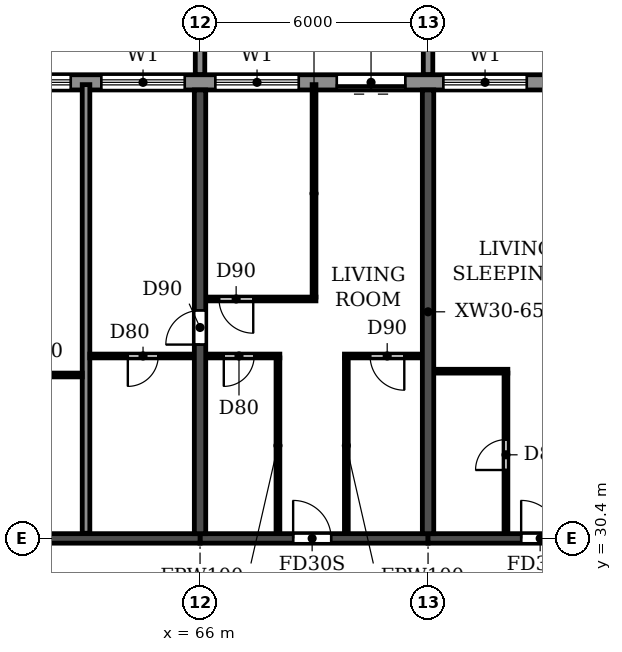
"""IFC4 building model, lengths in metres.
Left out: names, types, materials, properties, quantities, classifications, styles, units other than length and angle.
Written with IfcOpenShell. Run it as: python <this file> out.ifc"""

import sys

from ifc_helpers import new_model, si_unit, direction, frame, frame_2d, origin, place, context, subcontext, project, spatial, polyline, rectangle, outline, extrude, source, transform, mapped, element, fill, save


model = new_model("IFC4")
c1 = context("Model", 3, precision=1e-05, world=origin(), true_north=direction((0.0, 1.0)))
c2 = subcontext(c1, "Body", "Model", "MODEL_VIEW")
j1 = project(units=[si_unit("LENGTHUNIT", "METRE"), si_unit("PLANEANGLEUNIT", "RADIAN")], contexts=[c1])
p1 = place(None, origin())
s1 = spatial("IfcSite", under=j1, at=p1, CompositionType="ELEMENT")
p2 = place(p1, origin())
s2 = spatial("IfcBuilding", under=s1, at=p2, CompositionType="ELEMENT")
p3 = place(p2, frame((0.0, 0.0, 132.3)))
s3 = spatial("IfcBuildingStorey", under=s2, at=p3, CompositionType="ELEMENT", Elevation=132.3)
p4 = place(p3, frame((66.0, 30.525, 0.0), z_axis=(0.0, 0.0, 1.0), x_axis=(0.0, 1.0, 0.0)))
e1 = element("IfcWall", 1, at=p4, inside=s3, PredefinedType="SHEAR", context=c2, shape_type="SweptSolid", body=[
    extrude(rectangle(XDim=11.675, YDim=0.3, at=frame_2d((5.837, 0.0))), origin(), (0.0, 0.0, 1.0), 3.07),
])
p5 = place(p4, frame((4.975, 0.0, 0.0)))
e2 = element("IfcOpeningElement", 2, at=p5, cuts=e1, PredefinedType="OPENING", context=c2, shape_type="SweptSolid", body=[
    extrude(rectangle(XDim=0.9, YDim=2.1, at=frame_2d((0.45, 1.05))), frame((0.0, 0.16, 0.0), z_axis=(0.0, -1.0, 0.0), x_axis=(1.0, 0.0, 0.0)), (0.0, 0.0, 1.0), 0.32),
])
p6 = place(p3, frame((72.0, 30.525, 0.0), z_axis=(0.0, 0.0, 1.0), x_axis=(0.0, 1.0, 0.0)))
e3 = element("IfcWall", 3, at=p6, inside=s3, PredefinedType="SHEAR", context=c2, shape_type="SweptSolid", body=[
    extrude(rectangle(XDim=11.675, YDim=0.3, at=frame_2d((5.837, 0.0))), origin(), (0.0, 0.0, 1.0), 3.07),
])
p7 = place(p3, frame((60.0, 30.4, 0.0), z_axis=(0.0, 0.0, 1.0), x_axis=(1.0, 0.0, 0.0)))
e4 = element("IfcWall", 4, at=p7, inside=s3, PredefinedType="SHEAR", context=c2, shape_type="SweptSolid", body=[
    extrude(rectangle(XDim=6.0, YDim=0.25, at=frame_2d((3.0, 0.0))), origin(), (0.0, 0.0, 1.0), 2.47),
])
p8 = place(p3, frame((66.0, 30.4, 0.0), z_axis=(0.0, 0.0, 1.0), x_axis=(1.0, 0.0, 0.0)))
e5 = element("IfcWall", 5, at=p8, inside=s3, PredefinedType="SHEAR", context=c2, shape_type="SweptSolid", body=[
    extrude(rectangle(XDim=6.0, YDim=0.25, at=frame_2d((3.0, 0.0))), origin(), (0.0, 0.0, 1.0), 2.47),
])
p9 = place(p8, frame((2.45, 0.0, 0.0)))
e6 = element("IfcOpeningElement", 6, at=p9, cuts=e5, PredefinedType="OPENING", context=c2, shape_type="SweptSolid", body=[
    extrude(rectangle(XDim=1.0, YDim=2.1, at=frame_2d((0.5, 1.05))), frame((0.0, 0.135, 0.0), z_axis=(0.0, -1.0, 0.0), x_axis=(1.0, 0.0, 0.0)), (0.0, 0.0, 1.0), 0.27),
])
p10 = place(p3, frame((72.0, 30.4, 0.0), z_axis=(0.0, 0.0, 1.0), x_axis=(1.0, 0.0, 0.0)))
e7 = element("IfcWall", 7, at=p10, inside=s3, PredefinedType="SHEAR", context=c2, shape_type="SweptSolid", body=[
    extrude(rectangle(XDim=6.0, YDim=0.25, at=frame_2d((3.0, 0.0))), origin(), (0.0, 0.0, 1.0), 2.47),
])
p11 = place(p10, frame((2.45, 0.0, 0.0)))
e8 = element("IfcOpeningElement", 8, at=p11, cuts=e7, PredefinedType="OPENING", context=c2, shape_type="SweptSolid", body=[
    extrude(rectangle(XDim=1.0, YDim=2.1, at=frame_2d((0.5, 1.05))), frame((0.0, 0.135, 0.0), z_axis=(0.0, -1.0, 0.0), x_axis=(1.0, 0.0, 0.0)), (0.0, 0.0, 1.0), 0.27),
])
p12 = place(p3, frame((85.317, 42.4, 0.0), z_axis=(0.0, 0.0, 1.0), x_axis=(-1.0, 0.0, 0.0)))
e9 = element("IfcWall", 9, at=p12, inside=s3, PredefinedType="STANDARD", context=c2, shape_type="SweptSolid", body=[
    extrude(rectangle(XDim=68.634, YDim=0.4, at=frame_2d((34.317, 0.0))), origin(), (0.0, 0.0, 1.0), 3.07),
])
p13 = place(p12, frame((64.917, 0.0, 0.0)))
e10 = element("IfcOpeningElement", 10, at=p13, cuts=e9, PredefinedType="OPENING", context=c2, shape_type="SweptSolid", body=[
    extrude(rectangle(XDim=1.8, YDim=2.4, at=frame_2d((0.9, 1.2))), frame((0.0, 0.21, 0.0), z_axis=(0.0, -1.0, 0.0), x_axis=(1.0, 0.0, 0.0)), (0.0, 0.0, 1.0), 0.42),
])
p14 = place(p12, frame((61.717, 0.0, 0.9)))
e11 = element("IfcOpeningElement", 11, at=p14, cuts=e9, PredefinedType="OPENING", context=c2, shape_type="SweptSolid", body=[
    extrude(rectangle(XDim=2.2, YDim=1.5, at=frame_2d((1.1, 0.75))), frame((0.0, 0.21, 0.0), z_axis=(0.0, -1.0, 0.0), x_axis=(1.0, 0.0, 0.0)), (0.0, 0.0, 1.0), 0.42),
])
p15 = place(p12, frame((58.717, 0.0, 0.9)))
e12 = element("IfcOpeningElement", 12, at=p15, cuts=e9, PredefinedType="OPENING", context=c2, shape_type="SweptSolid", body=[
    extrude(rectangle(XDim=2.2, YDim=1.5, at=frame_2d((1.1, 0.75))), frame((0.0, 0.21, 0.0), z_axis=(0.0, -1.0, 0.0), x_axis=(1.0, 0.0, 0.0)), (0.0, 0.0, 1.0), 0.42),
])
p16 = place(p12, frame((55.717, 0.0, 0.9)))
e13 = element("IfcOpeningElement", 13, at=p16, cuts=e9, PredefinedType="OPENING", context=c2, shape_type="SweptSolid", body=[
    extrude(rectangle(XDim=2.2, YDim=1.5, at=frame_2d((1.1, 0.75))), frame((0.0, 0.21, 0.0), z_axis=(0.0, -1.0, 0.0), x_axis=(1.0, 0.0, 0.0)), (0.0, 0.0, 1.0), 0.42),
])
p17 = place(p12, frame((52.917, 0.0, 0.0)))
e14 = element("IfcOpeningElement", 14, at=p17, cuts=e9, PredefinedType="OPENING", context=c2, shape_type="SweptSolid", body=[
    extrude(rectangle(XDim=1.8, YDim=2.4, at=frame_2d((0.9, 1.2))), frame((0.0, 0.21, 0.0), z_axis=(0.0, -1.0, 0.0), x_axis=(1.0, 0.0, 0.0)), (0.0, 0.0, 1.0), 0.42),
])
p18 = place(p12, frame((49.717, 0.0, 0.9)))
e15 = element("IfcOpeningElement", 15, at=p18, cuts=e9, PredefinedType="OPENING", context=c2, shape_type="SweptSolid", body=[
    extrude(rectangle(XDim=2.2, YDim=1.5, at=frame_2d((1.1, 0.75))), frame((0.0, 0.21, 0.0), z_axis=(0.0, -1.0, 0.0), x_axis=(1.0, 0.0, 0.0)), (0.0, 0.0, 1.0), 0.42),
])
p19 = place(p12, frame((46.717, 0.0, 0.9)))
e16 = element("IfcOpeningElement", 16, at=p19, cuts=e9, PredefinedType="OPENING", context=c2, shape_type="SweptSolid", body=[
    extrude(rectangle(XDim=2.2, YDim=1.5, at=frame_2d((1.1, 0.75))), frame((0.0, 0.21, 0.0), z_axis=(0.0, -1.0, 0.0), x_axis=(1.0, 0.0, 0.0)), (0.0, 0.0, 1.0), 0.42),
])
p20 = place(p12, frame((43.917, 0.0, 0.0)))
e17 = element("IfcOpeningElement", 17, at=p20, cuts=e9, PredefinedType="OPENING", context=c2, shape_type="SweptSolid", body=[
    extrude(rectangle(XDim=1.8, YDim=2.4, at=frame_2d((0.9, 1.2))), frame((0.0, 0.21, 0.0), z_axis=(0.0, -1.0, 0.0), x_axis=(1.0, 0.0, 0.0)), (0.0, 0.0, 1.0), 0.42),
])
p21 = place(p12, frame((40.917, 0.0, 0.0)))
e18 = element("IfcOpeningElement", 18, at=p21, cuts=e9, PredefinedType="OPENING", context=c2, shape_type="SweptSolid", body=[
    extrude(rectangle(XDim=1.8, YDim=2.4, at=frame_2d((0.9, 1.2))), frame((0.0, 0.21, 0.0), z_axis=(0.0, -1.0, 0.0), x_axis=(1.0, 0.0, 0.0)), (0.0, 0.0, 1.0), 0.42),
])
p22 = place(p12, frame((37.717, 0.0, 0.9)))
e19 = element("IfcOpeningElement", 19, at=p22, cuts=e9, PredefinedType="OPENING", context=c2, shape_type="SweptSolid", body=[
    extrude(rectangle(XDim=2.2, YDim=1.5, at=frame_2d((1.1, 0.75))), frame((0.0, 0.21, 0.0), z_axis=(0.0, -1.0, 0.0), x_axis=(1.0, 0.0, 0.0)), (0.0, 0.0, 1.0), 0.42),
])
p23 = place(p12, frame((34.717, 0.0, 0.9)))
e20 = element("IfcOpeningElement", 20, at=p23, cuts=e9, PredefinedType="OPENING", context=c2, shape_type="SweptSolid", body=[
    extrude(rectangle(XDim=2.2, YDim=1.5, at=frame_2d((1.1, 0.75))), frame((0.0, 0.21, 0.0), z_axis=(0.0, -1.0, 0.0), x_axis=(1.0, 0.0, 0.0)), (0.0, 0.0, 1.0), 0.42),
])
p24 = place(p12, frame((31.717, 0.0, 0.9)))
e21 = element("IfcOpeningElement", 21, at=p24, cuts=e9, PredefinedType="OPENING", context=c2, shape_type="SweptSolid", body=[
    extrude(rectangle(XDim=2.2, YDim=1.5, at=frame_2d((1.1, 0.75))), frame((0.0, 0.21, 0.0), z_axis=(0.0, -1.0, 0.0), x_axis=(1.0, 0.0, 0.0)), (0.0, 0.0, 1.0), 0.42),
])
p25 = place(p12, frame((28.917, 0.0, 0.0)))
e22 = element("IfcOpeningElement", 22, at=p25, cuts=e9, PredefinedType="OPENING", context=c2, shape_type="SweptSolid", body=[
    extrude(rectangle(XDim=1.8, YDim=2.4, at=frame_2d((0.9, 1.2))), frame((0.0, 0.21, 0.0), z_axis=(0.0, -1.0, 0.0), x_axis=(1.0, 0.0, 0.0)), (0.0, 0.0, 1.0), 0.42),
])
p26 = place(p12, frame((25.717, 0.0, 0.9)))
e23 = element("IfcOpeningElement", 23, at=p26, cuts=e9, PredefinedType="OPENING", context=c2, shape_type="SweptSolid", body=[
    extrude(rectangle(XDim=2.2, YDim=1.5, at=frame_2d((1.1, 0.75))), frame((0.0, 0.21, 0.0), z_axis=(0.0, -1.0, 0.0), x_axis=(1.0, 0.0, 0.0)), (0.0, 0.0, 1.0), 0.42),
])
p27 = place(p12, frame((22.717, 0.0, 0.9)))
e24 = element("IfcOpeningElement", 24, at=p27, cuts=e9, PredefinedType="OPENING", context=c2, shape_type="SweptSolid", body=[
    extrude(rectangle(XDim=2.2, YDim=1.5, at=frame_2d((1.1, 0.75))), frame((0.0, 0.21, 0.0), z_axis=(0.0, -1.0, 0.0), x_axis=(1.0, 0.0, 0.0)), (0.0, 0.0, 1.0), 0.42),
])
p28 = place(p12, frame((19.717, 0.0, 0.9)))
e25 = element("IfcOpeningElement", 25, at=p28, cuts=e9, PredefinedType="OPENING", context=c2, shape_type="SweptSolid", body=[
    extrude(rectangle(XDim=2.2, YDim=1.5, at=frame_2d((1.1, 0.75))), frame((0.0, 0.21, 0.0), z_axis=(0.0, -1.0, 0.0), x_axis=(1.0, 0.0, 0.0)), (0.0, 0.0, 1.0), 0.42),
])
p29 = place(p12, frame((16.717, 0.0, 0.9)))
e26 = element("IfcOpeningElement", 26, at=p29, cuts=e9, PredefinedType="OPENING", context=c2, shape_type="SweptSolid", body=[
    extrude(rectangle(XDim=2.2, YDim=1.5, at=frame_2d((1.1, 0.75))), frame((0.0, 0.21, 0.0), z_axis=(0.0, -1.0, 0.0), x_axis=(1.0, 0.0, 0.0)), (0.0, 0.0, 1.0), 0.42),
])
p30 = place(p12, frame((13.917, 0.0, 0.0)))
e27 = element("IfcOpeningElement", 27, at=p30, cuts=e9, PredefinedType="OPENING", context=c2, shape_type="SweptSolid", body=[
    extrude(rectangle(XDim=1.8, YDim=2.4, at=frame_2d((0.9, 1.2))), frame((0.0, 0.21, 0.0), z_axis=(0.0, -1.0, 0.0), x_axis=(1.0, 0.0, 0.0)), (0.0, 0.0, 1.0), 0.42),
])
p31 = place(p12, frame((10.717, 0.0, 0.9)))
e28 = element("IfcOpeningElement", 28, at=p31, cuts=e9, PredefinedType="OPENING", context=c2, shape_type="SweptSolid", body=[
    extrude(rectangle(XDim=2.2, YDim=1.5, at=frame_2d((1.1, 0.75))), frame((0.0, 0.21, 0.0), z_axis=(0.0, -1.0, 0.0), x_axis=(1.0, 0.0, 0.0)), (0.0, 0.0, 1.0), 0.42),
])
p32 = place(p12, frame((7.917, 0.0, 0.0)))
e29 = element("IfcOpeningElement", 29, at=p32, cuts=e9, PredefinedType="OPENING", context=c2, shape_type="SweptSolid", body=[
    extrude(rectangle(XDim=1.8, YDim=2.4, at=frame_2d((0.9, 1.2))), frame((0.0, 0.21, 0.0), z_axis=(0.0, -1.0, 0.0), x_axis=(1.0, 0.0, 0.0)), (0.0, 0.0, 1.0), 0.42),
])
p33 = place(p12, frame((4.717, 0.0, 0.9)))
e30 = element("IfcOpeningElement", 30, at=p33, cuts=e9, PredefinedType="OPENING", context=c2, shape_type="SweptSolid", body=[
    extrude(rectangle(XDim=2.2, YDim=1.5, at=frame_2d((1.1, 0.75))), frame((0.0, 0.21, 0.0), z_axis=(0.0, -1.0, 0.0), x_axis=(1.0, 0.0, 0.0)), (0.0, 0.0, 1.0), 0.42),
])
p34 = place(p12, frame((1.917, 0.0, 0.0)))
e31 = element("IfcOpeningElement", 31, at=p34, cuts=e9, PredefinedType="OPENING", context=c2, shape_type="SweptSolid", body=[
    extrude(rectangle(XDim=1.8, YDim=2.4, at=frame_2d((0.9, 1.2))), frame((0.0, 0.21, 0.0), z_axis=(0.0, -1.0, 0.0), x_axis=(1.0, 0.0, 0.0)), (0.0, 0.0, 1.0), 0.42),
])
m1 = source(origin(), c2, "Body", "SweptSolid", [
    extrude(outline(polyline([(0.0, 0.0), (0.25, 0.0), (0.25, 3.1), (0.0, 3.1), (0.0, 0.0)])), origin(), (0.0, 0.0, 1.0), 3.1),
])
for number, where in (
    (32, (65.875, 42.6, 0.0)),
    (33, (71.875, 42.6, 0.0)),
):
    element("IfcWall", number, at=place(p3, frame(where)), inside=s3, PredefinedType="STANDARD", context=c2, shape_type="MappedRepresentation", body=[
        mapped(m1, transform((0.0, 0.0, 0.0))),
    ])
p35 = place(p3, frame((63.0, 30.535, 0.0), z_axis=(0.0, 0.0, 1.0), x_axis=(0.0, 1.0, 0.0)))
e34 = element("IfcWall", 34, at=p35, inside=s3, PredefinedType="PARTITIONING", context=c2, shape_type="SweptSolid", body=[
    extrude(rectangle(XDim=11.805, YDim=0.2, at=frame_2d((5.903, 0.0))), origin(), (0.0, 0.0, 1.0), 3.07),
])
p36 = place(p3, frame((60.16, 34.7, 0.0), z_axis=(0.0, 0.0, 1.0), x_axis=(1.0, 0.0, 0.0)))
e35 = element("IfcWall", 35, at=p36, inside=s3, PredefinedType="PARTITIONING", context=c2, shape_type="SweptSolid", body=[
    extrude(rectangle(XDim=2.74, YDim=0.1, at=frame_2d((1.37, 0.0))), origin(), (0.0, 0.0, 1.0), 3.07),
])
p37 = place(p36, frame((0.94, 0.0, 0.0)))
e36 = element("IfcOpeningElement", 36, at=p37, cuts=e35, PredefinedType="OPENING", context=c2, shape_type="SweptSolid", body=[
    extrude(rectangle(XDim=0.8, YDim=2.1, at=frame_2d((0.4, 1.05))), frame((0.0, 0.06, 0.0), z_axis=(0.0, -1.0, 0.0), x_axis=(1.0, 0.0, 0.0)), (0.0, 0.0, 1.0), 0.12),
])
p38 = place(p3, frame((72.16, 34.8, 0.0), z_axis=(0.0, 0.0, 1.0), x_axis=(1.0, 0.0, 0.0)))
e37 = element("IfcWall", 37, at=p38, inside=s3, PredefinedType="PARTITIONING", context=c2, shape_type="SweptSolid", body=[
    extrude(rectangle(XDim=1.94, YDim=0.1, at=frame_2d((0.97, 0.0))), origin(), (0.0, 0.0, 1.0), 3.07),
])
p39 = place(p3, frame((63.1, 35.2, 0.0), z_axis=(0.0, 0.0, 1.0), x_axis=(1.0, 0.0, 0.0)))
e38 = element("IfcWall", 38, at=p39, inside=s3, PredefinedType="PARTITIONING", context=c2, shape_type="SweptSolid", body=[
    extrude(rectangle(XDim=2.74, YDim=0.1, at=frame_2d((1.37, 0.0))), origin(), (0.0, 0.0, 1.0), 3.07),
])
p40 = place(p39, frame((1.0, 0.0, 0.0)))
e39 = element("IfcOpeningElement", 39, at=p40, cuts=e38, PredefinedType="OPENING", context=c2, shape_type="SweptSolid", body=[
    extrude(rectangle(XDim=0.8, YDim=2.1, at=frame_2d((0.4, 1.05))), frame((0.0, 0.06, 0.0), z_axis=(0.0, -1.0, 0.0), x_axis=(1.0, 0.0, 0.0)), (0.0, 0.0, 1.0), 0.12),
])
p41 = place(p3, frame((66.16, 35.2, 0.0), z_axis=(0.0, 0.0, 1.0), x_axis=(1.0, 0.0, 0.0)))
e40 = element("IfcWall", 40, at=p41, inside=s3, PredefinedType="PARTITIONING", context=c2, shape_type="SweptSolid", body=[
    extrude(rectangle(XDim=1.94, YDim=0.1, at=frame_2d((0.97, 0.0))), origin(), (0.0, 0.0, 1.0), 3.07),
])
p42 = place(p41, frame((0.465, 0.0, 0.0)))
e41 = element("IfcOpeningElement", 41, at=p42, cuts=e40, PredefinedType="OPENING", context=c2, shape_type="SweptSolid", body=[
    extrude(rectangle(XDim=0.8, YDim=2.1, at=frame_2d((0.4, 1.05))), frame((0.0, 0.06, 0.0), z_axis=(0.0, -1.0, 0.0), x_axis=(1.0, 0.0, 0.0)), (0.0, 0.0, 1.0), 0.12),
])
p43 = place(p3, frame((69.8, 35.2, 0.0), z_axis=(0.0, 0.0, 1.0), x_axis=(1.0, 0.0, 0.0)))
e42 = element("IfcWall", 42, at=p43, inside=s3, PredefinedType="PARTITIONING", context=c2, shape_type="SweptSolid", body=[
    extrude(rectangle(XDim=2.04, YDim=0.1, at=frame_2d((1.02, 0.0))), origin(), (0.0, 0.0, 1.0), 3.07),
])
p44 = place(p43, frame((0.675, 0.0, 0.0)))
e43 = element("IfcOpeningElement", 43, at=p44, cuts=e42, PredefinedType="OPENING", context=c2, shape_type="SweptSolid", body=[
    extrude(rectangle(XDim=0.9, YDim=2.1, at=frame_2d((0.45, 1.05))), frame((0.0, 0.06, 0.0), z_axis=(0.0, -1.0, 0.0), x_axis=(1.0, 0.0, 0.0)), (0.0, 0.0, 1.0), 0.12),
])
p45 = place(p3, frame((66.16, 36.7, 0.0), z_axis=(0.0, 0.0, 1.0), x_axis=(1.0, 0.0, 0.0)))
e44 = element("IfcWall", 44, at=p45, inside=s3, PredefinedType="PARTITIONING", context=c2, shape_type="SweptSolid", body=[
    extrude(rectangle(XDim=2.89, YDim=0.1, at=frame_2d((1.445, 0.0))), origin(), (0.0, 0.0, 1.0), 3.07),
])
p46 = place(p45, frame((0.34, 0.0, 0.0)))
e45 = element("IfcOpeningElement", 45, at=p46, cuts=e44, PredefinedType="OPENING", context=c2, shape_type="SweptSolid", body=[
    extrude(rectangle(XDim=0.9, YDim=2.1, at=frame_2d((0.45, 1.05))), frame((0.0, 0.06, 0.0), z_axis=(0.0, -1.0, 0.0), x_axis=(1.0, 0.0, 0.0)), (0.0, 0.0, 1.0), 0.12),
])
p47 = place(p3, frame((68.05, 30.535, 0.0), z_axis=(0.0, 0.0, 1.0), x_axis=(0.0, 1.0, 0.0)))
e46 = element("IfcWall", 46, at=p47, inside=s3, PredefinedType="PARTITIONING", context=c2, shape_type="SweptSolid", body=[
    extrude(rectangle(XDim=4.615, YDim=0.1, at=frame_2d((2.308, 0.0))), origin(), (0.0, 0.0, 1.0), 3.07),
])
p48 = place(p3, frame((69.0, 36.75, 0.0), z_axis=(0.0, 0.0, 1.0), x_axis=(0.0, 1.0, 0.0)))
e47 = element("IfcWall", 47, at=p48, inside=s3, PredefinedType="PARTITIONING", context=c2, shape_type="SweptSolid", body=[
    extrude(rectangle(XDim=5.59, YDim=0.1, at=frame_2d((2.795, 0.0))), origin(), (0.0, 0.0, 1.0), 3.07),
])
p49 = place(p3, frame((69.85, 30.535, 0.0), z_axis=(0.0, 0.0, 1.0), x_axis=(0.0, 1.0, 0.0)))
e48 = element("IfcWall", 48, at=p49, inside=s3, PredefinedType="PARTITIONING", context=c2, shape_type="SweptSolid", body=[
    extrude(rectangle(XDim=4.615, YDim=0.1, at=frame_2d((2.308, 0.0))), origin(), (0.0, 0.0, 1.0), 3.07),
])
p50 = place(p3, frame((74.05, 30.535, 0.0), z_axis=(0.0, 0.0, 1.0), x_axis=(0.0, 1.0, 0.0)))
e49 = element("IfcWall", 49, at=p50, inside=s3, PredefinedType="PARTITIONING", context=c2, shape_type="SweptSolid", body=[
    extrude(rectangle(XDim=4.215, YDim=0.1, at=frame_2d((2.107, 0.0))), origin(), (0.0, 0.0, 1.0), 3.07),
])
p51 = place(p50, frame((1.665, 0.0, 0.0)))
e50 = element("IfcOpeningElement", 50, at=p51, cuts=e49, PredefinedType="OPENING", context=c2, shape_type="SweptSolid", body=[
    extrude(rectangle(XDim=0.8, YDim=2.1, at=frame_2d((0.4, 1.05))), frame((0.0, 0.06, 0.0), z_axis=(0.0, -1.0, 0.0), x_axis=(1.0, 0.0, 0.0)), (0.0, 0.0, 1.0), 0.12),
])
p52 = place(p27, origin())
e51 = element("IfcWindow", 51, at=p52, inside=s3, PartitioningType="DOUBLE_PANEL_HORIZONTAL", PredefinedType="WINDOW", context=c2, shape_type="SweptSolid", body=[
    extrude(rectangle(XDim=2.2, YDim=1.5, at=frame_2d((1.1, 0.75))), frame((0.0, 0.03, 0.0), z_axis=(0.0, -1.0, 0.0), x_axis=(1.0, 0.0, 0.0)), (0.0, 0.0, 1.0), 0.06),
])
fill(e24, e51)
p53 = place(p28, origin())
e52 = element("IfcWindow", 52, at=p53, inside=s3, PartitioningType="DOUBLE_PANEL_HORIZONTAL", PredefinedType="WINDOW", context=c2, shape_type="SweptSolid", body=[
    extrude(rectangle(XDim=2.2, YDim=1.5, at=frame_2d((1.1, 0.75))), frame((0.0, 0.03, 0.0), z_axis=(0.0, -1.0, 0.0), x_axis=(1.0, 0.0, 0.0)), (0.0, 0.0, 1.0), 0.06),
])
fill(e25, e52)
p54 = place(p29, origin())
e53 = element("IfcWindow", 53, at=p54, inside=s3, PartitioningType="DOUBLE_PANEL_HORIZONTAL", PredefinedType="WINDOW", context=c2, shape_type="SweptSolid", body=[
    extrude(rectangle(XDim=2.2, YDim=1.5, at=frame_2d((1.1, 0.75))), frame((0.0, 0.03, 0.0), z_axis=(0.0, -1.0, 0.0), x_axis=(1.0, 0.0, 0.0)), (0.0, 0.0, 1.0), 0.06),
])
fill(e26, e53)
p55 = place(p30, origin())
e54 = element("IfcDoor", 54, at=p55, inside=s3, OperationType="DOUBLE_DOOR_SLIDING", PredefinedType="DOOR", context=c2, shape_type="SweptSolid", body=[
    extrude(rectangle(XDim=1.8, YDim=2.4, at=frame_2d((0.9, 1.2))), frame((0.0, 0.025, 0.0), z_axis=(0.0, -1.0, 0.0), x_axis=(1.0, 0.0, 0.0)), (0.0, 0.0, 1.0), 0.05),
])
fill(e27, e54)
p56 = place(p31, origin())
e55 = element("IfcWindow", 55, at=p56, inside=s3, PartitioningType="DOUBLE_PANEL_HORIZONTAL", PredefinedType="WINDOW", context=c2, shape_type="SweptSolid", body=[
    extrude(rectangle(XDim=2.2, YDim=1.5, at=frame_2d((1.1, 0.75))), frame((0.0, 0.03, 0.0), z_axis=(0.0, -1.0, 0.0), x_axis=(1.0, 0.0, 0.0)), (0.0, 0.0, 1.0), 0.06),
])
fill(e28, e55)
p57 = place(p40, frame((0.8, 0.0, 0.0), z_axis=(0.0, 0.0, 1.0), x_axis=(-1.0, 0.0, 0.0)))
e56 = element("IfcDoor", 56, at=p57, inside=s3, OperationType="SINGLE_SWING_RIGHT", PredefinedType="DOOR", context=c2, shape_type="SweptSolid", body=[
    extrude(rectangle(XDim=0.8, YDim=2.1, at=frame_2d((0.4, 1.05))), frame((0.0, 0.025, 0.0), z_axis=(0.0, -1.0, 0.0), x_axis=(1.0, 0.0, 0.0)), (0.0, 0.0, 1.0), 0.05),
])
fill(e39, e56)
p58 = place(p5, origin())
e57 = element("IfcDoor", 57, at=p58, inside=s3, OperationType="SINGLE_SWING_LEFT", PredefinedType="DOOR", context=c2, shape_type="SweptSolid", body=[
    extrude(rectangle(XDim=0.9, YDim=2.1, at=frame_2d((0.45, 1.05))), frame((0.0, 0.025, 0.0), z_axis=(0.0, -1.0, 0.0), x_axis=(1.0, 0.0, 0.0)), (0.0, 0.0, 1.0), 0.05),
])
fill(e2, e57)
p59 = place(p46, frame((0.9, 0.0, 0.0), z_axis=(0.0, 0.0, 1.0), x_axis=(-1.0, 0.0, 0.0)))
e58 = element("IfcDoor", 58, at=p59, inside=s3, OperationType="SINGLE_SWING_LEFT", PredefinedType="DOOR", context=c2, shape_type="SweptSolid", body=[
    extrude(rectangle(XDim=0.9, YDim=2.1, at=frame_2d((0.45, 1.05))), frame((0.0, 0.025, 0.0), z_axis=(0.0, -1.0, 0.0), x_axis=(1.0, 0.0, 0.0)), (0.0, 0.0, 1.0), 0.05),
])
fill(e45, e58)
p60 = place(p42, frame((0.8, 0.0, 0.0), z_axis=(0.0, 0.0, 1.0), x_axis=(-1.0, 0.0, 0.0)))
e59 = element("IfcDoor", 59, at=p60, inside=s3, OperationType="SINGLE_SWING_RIGHT", PredefinedType="DOOR", context=c2, shape_type="SweptSolid", body=[
    extrude(rectangle(XDim=0.8, YDim=2.1, at=frame_2d((0.4, 1.05))), frame((0.0, 0.025, 0.0), z_axis=(0.0, -1.0, 0.0), x_axis=(1.0, 0.0, 0.0)), (0.0, 0.0, 1.0), 0.05),
])
fill(e41, e59)
p61 = place(p9, origin())
e60 = element("IfcDoor", 60, at=p61, inside=s3, OperationType="SINGLE_SWING_LEFT", PredefinedType="DOOR", context=c2, shape_type="SweptSolid", body=[
    extrude(rectangle(XDim=1.0, YDim=2.1, at=frame_2d((0.5, 1.05))), frame((0.0, 0.025, 0.0), z_axis=(0.0, -1.0, 0.0), x_axis=(1.0, 0.0, 0.0)), (0.0, 0.0, 1.0), 0.05),
])
fill(e6, e60)
p62 = place(p44, frame((0.9, 0.0, 0.0), z_axis=(0.0, 0.0, 1.0), x_axis=(-1.0, 0.0, 0.0)))
e61 = element("IfcDoor", 61, at=p62, inside=s3, OperationType="SINGLE_SWING_LEFT", PredefinedType="DOOR", context=c2, shape_type="SweptSolid", body=[
    extrude(rectangle(XDim=0.9, YDim=2.1, at=frame_2d((0.45, 1.05))), frame((0.0, 0.025, 0.0), z_axis=(0.0, -1.0, 0.0), x_axis=(1.0, 0.0, 0.0)), (0.0, 0.0, 1.0), 0.05),
])
fill(e43, e61)
p63 = place(p51, origin())
e62 = element("IfcDoor", 62, at=p63, inside=s3, OperationType="SINGLE_SWING_LEFT", PredefinedType="DOOR", context=c2, shape_type="SweptSolid", body=[
    extrude(rectangle(XDim=0.8, YDim=2.1, at=frame_2d((0.4, 1.05))), frame((0.0, 0.025, 0.0), z_axis=(0.0, -1.0, 0.0), x_axis=(1.0, 0.0, 0.0)), (0.0, 0.0, 1.0), 0.05),
])
fill(e50, e62)
p64 = place(p11, origin())
e63 = element("IfcDoor", 63, at=p64, inside=s3, OperationType="SINGLE_SWING_LEFT", PredefinedType="DOOR", context=c2, shape_type="SweptSolid", body=[
    extrude(rectangle(XDim=1.0, YDim=2.1, at=frame_2d((0.5, 1.05))), frame((0.0, 0.025, 0.0), z_axis=(0.0, -1.0, 0.0), x_axis=(1.0, 0.0, 0.0)), (0.0, 0.0, 1.0), 0.05),
])
fill(e8, e63)
save(model, sys.argv[1])
